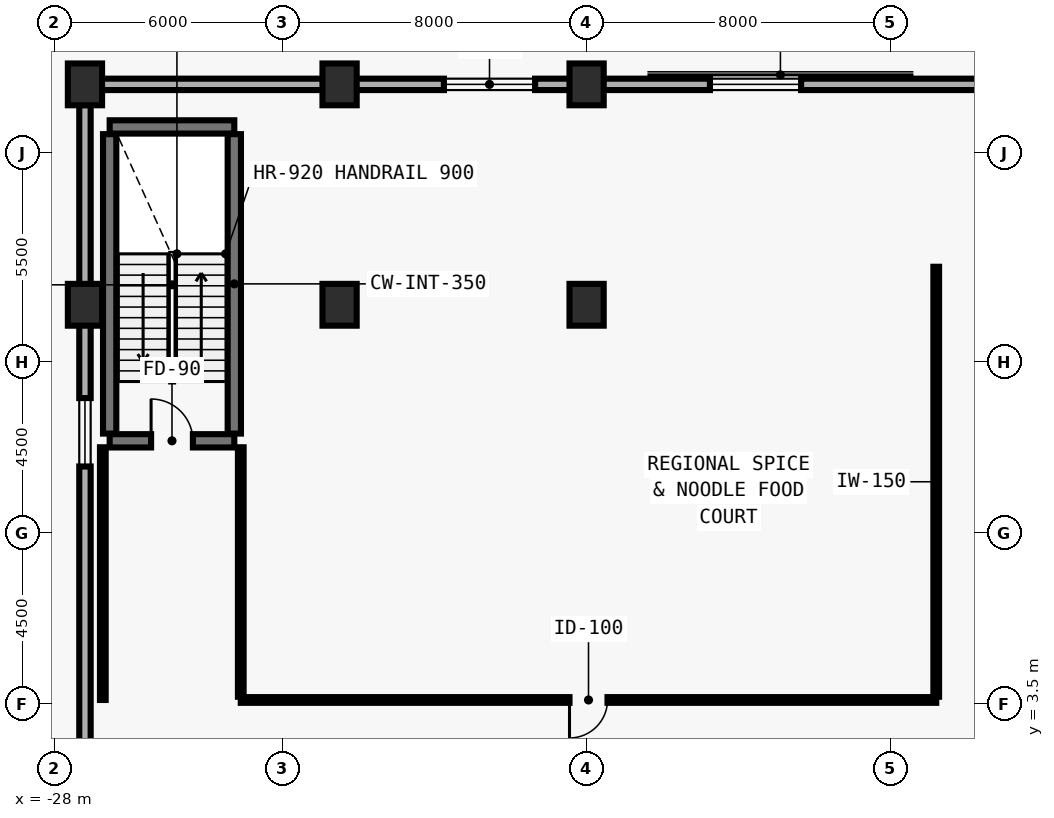
"""IFC4 building model, lengths in metres.
Left out: names, types, materials, properties, quantities, classifications, styles, units other than length and angle.
Written with IfcOpenShell. Run it as: python <this file> out.ifc"""

import sys

from ifc_helpers import new_model, si_unit, direction, frame, frame_2d, origin, origin_2d, place, context, subcontext, project, spatial, rectangle, extrude, element, fill, save


model = new_model("IFC4")
c1 = context("Model", 3, precision=1e-05, world=origin(), true_north=direction((0.0, 1.0)))
c2 = subcontext(c1, "Body", "Model", "MODEL_VIEW")
j1 = project(units=[si_unit("LENGTHUNIT", "METRE"), si_unit("PLANEANGLEUNIT", "RADIAN")], contexts=[c1])
p1 = place(None, origin())
s1 = spatial("IfcSite", under=j1, at=p1, CompositionType="ELEMENT")
p2 = place(p1, origin())
s2 = spatial("IfcBuilding", under=s1, at=p2, CompositionType="ELEMENT")
p3 = place(p2, frame((0.0, 0.0, 13.8)))
s3 = spatial("IfcBuildingStorey", under=s2, at=p3, CompositionType="ELEMENT", Elevation=13.8)
p4 = place(p3, frame((-26.55, 10.42, 0.0), z_axis=(0.0, 0.0, 1.0), x_axis=(1.0, 0.0, 0.0)))
e1 = element("IfcWall", 1, at=p4, inside=s3, PredefinedType="SHEAR", context=c2, shape_type="SweptSolid", body=[
    extrude(rectangle(XDim=3.28, YDim=0.35, at=frame_2d((1.64, 0.0))), origin(), (0.0, 0.0, 1.0), 4.592),
])
p5 = place(p4, frame((1.09, 0.0, 0.0)))
e2 = element("IfcOpeningElement", 2, at=p5, cuts=e1, PredefinedType="OPENING", context=c2, shape_type="SweptSolid", body=[
    extrude(rectangle(XDim=1.1, YDim=2.15, at=frame_2d((0.55, 1.075))), frame((0.0, 0.185, 0.0), z_axis=(0.0, -1.0, 0.0), x_axis=(1.0, 0.0, 0.0)), (0.0, 0.0, 1.0), 0.37),
])
p6 = place(p3, frame((-26.55, 18.68, 0.0), z_axis=(0.0, 0.0, 1.0), x_axis=(1.0, 0.0, 0.0)))
e3 = element("IfcWall", 3, at=p6, inside=s3, PredefinedType="SHEAR", context=c2, shape_type="SweptSolid", body=[
    extrude(rectangle(XDim=3.28, YDim=0.35, at=frame_2d((1.64, 0.0))), origin(), (0.0, 0.0, 1.0), 4.592),
])
for number, where, z_axis, x_axis in (
    (4, (-26.55, 10.61, 0.0), (0.0, 0.0, 1.0), (0.0, 1.0, 0.0)),
    (5, (-23.27, 10.61, 0.0), (0.0, 0.0, 1.0), (0.0, 1.0, 0.0)),
):
    element("IfcWall", number, at=place(p3, frame(where, z_axis=z_axis, x_axis=x_axis)), inside=s3, PredefinedType="SHEAR", context=c2, shape_type="SweptSolid", body=[
        extrude(rectangle(XDim=7.88, YDim=0.35, at=frame_2d((3.94, 0.0))), origin(), (0.0, 0.0, 1.0), 4.592),
    ])
for number, where, z_axis, x_axis in (
    (6, (-27.2, 14.0, 0.0), (0.0, 0.0, 1.0), (1.0, 0.0, 0.0)),
    (7, (-27.2, 19.8, 0.0), (0.0, 0.0, 1.0), (1.0, 0.0, 0.0)),
    (8, (-20.5, 14.0, 0.0), (0.0, 0.0, 1.0), (1.0, 0.0, 0.0)),
    (9, (-20.5, 19.8, 0.0), (0.0, 0.0, 1.0), (1.0, 0.0, 0.0)),
    (10, (-14.0, 14.0, 0.0), (0.0, 0.0, 1.0), (1.0, 0.0, 0.0)),
    (11, (-14.0, 19.8, 0.0), (0.0, 0.0, 1.0), (1.0, 0.0, 0.0)),
):
    element("IfcColumn", number, at=place(p3, frame(where, z_axis=z_axis, x_axis=x_axis)), inside=s3, PredefinedType="COLUMN", context=c2, shape_type="SweptSolid", body=[
        extrude(rectangle(XDim=0.9, YDim=1.1, at=origin_2d()), origin(), (0.0, 0.0, 1.0), 4.575),
    ])
p7 = place(p3, frame((-27.2, -19.255, 0.0), z_axis=(0.0, 0.0, 1.0), x_axis=(0.0, 1.0, 0.0)))
e12 = element("IfcWall", 12, at=p7, inside=s3, PredefinedType="SOLIDWALL", context=c2, shape_type="SweptSolid", body=[
    extrude(rectangle(XDim=38.51, YDim=0.3, at=frame_2d((19.255, 0.0))), origin(), (0.0, 0.0, 1.0), 3.35),
])
p8 = place(p7, frame((9.0, 0.0, 0.85)))
e13 = element("IfcOpeningElement", 13, at=p8, cuts=e12, PredefinedType="OPENING", context=c2, shape_type="SweptSolid", body=[
    extrude(rectangle(XDim=1.8, YDim=1.9, at=frame_2d((0.9, 0.95))), frame((0.0, 0.16, 0.0), z_axis=(0.0, -1.0, 0.0), x_axis=(1.0, 0.0, 0.0)), (0.0, 0.0, 1.0), 0.32),
])
p9 = place(p7, frame((16.0, 0.0, 0.85)))
e14 = element("IfcOpeningElement", 14, at=p9, cuts=e12, PredefinedType="OPENING", context=c2, shape_type="SweptSolid", body=[
    extrude(rectangle(XDim=1.8, YDim=1.9, at=frame_2d((0.9, 0.95))), frame((0.0, 0.16, 0.0), z_axis=(0.0, -1.0, 0.0), x_axis=(1.0, 0.0, 0.0)), (0.0, 0.0, 1.0), 0.32),
])
p10 = place(p7, frame((29.0, 0.0, 0.85)))
e15 = element("IfcOpeningElement", 15, at=p10, cuts=e12, PredefinedType="OPENING", context=c2, shape_type="SweptSolid", body=[
    extrude(rectangle(XDim=1.8, YDim=1.9, at=frame_2d((0.9, 0.95))), frame((0.0, 0.16, 0.0), z_axis=(0.0, -1.0, 0.0), x_axis=(1.0, 0.0, 0.0)), (0.0, 0.0, 1.0), 0.32),
])
p11 = place(p3, frame((-26.755, 19.8, 0.0), z_axis=(0.0, 0.0, 1.0), x_axis=(1.0, 0.0, 0.0)))
e16 = element("IfcWall", 16, at=p11, inside=s3, PredefinedType="SOLIDWALL", context=c2, shape_type="SweptSolid", body=[
    extrude(rectangle(XDim=53.51, YDim=0.3, at=frame_2d((26.755, 0.0))), origin(), (0.0, 0.0, 1.0), 3.35),
])
p12 = place(p11, frame((9.0, 0.0, 0.85)))
e17 = element("IfcOpeningElement", 17, at=p12, cuts=e16, PredefinedType="OPENING", context=c2, shape_type="SweptSolid", body=[
    extrude(rectangle(XDim=2.4, YDim=1.9, at=frame_2d((1.2, 0.95))), frame((0.0, 0.16, 0.0), z_axis=(0.0, -1.0, 0.0), x_axis=(1.0, 0.0, 0.0)), (0.0, 0.0, 1.0), 0.32),
])
p13 = place(p11, frame((16.0, 0.0, 0.85)))
e18 = element("IfcOpeningElement", 18, at=p13, cuts=e16, PredefinedType="OPENING", context=c2, shape_type="SweptSolid", body=[
    extrude(rectangle(XDim=2.4, YDim=1.9, at=frame_2d((1.2, 0.95))), frame((0.0, 0.16, 0.0), z_axis=(0.0, -1.0, 0.0), x_axis=(1.0, 0.0, 0.0)), (0.0, 0.0, 1.0), 0.32),
])
p14 = place(p11, frame((29.0, 0.0, 0.85)))
e19 = element("IfcOpeningElement", 19, at=p14, cuts=e16, PredefinedType="OPENING", context=c2, shape_type="SweptSolid", body=[
    extrude(rectangle(XDim=2.4, YDim=1.9, at=frame_2d((1.2, 0.95))), frame((0.0, 0.16, 0.0), z_axis=(0.0, -1.0, 0.0), x_axis=(1.0, 0.0, 0.0)), (0.0, 0.0, 1.0), 0.32),
])
p15 = place(p3, frame((-4.8, 3.6, 0.0), z_axis=(0.0, 0.0, 1.0), x_axis=(-1.0, 0.0, 0.0)))
e20 = element("IfcWall", 20, at=p15, inside=s3, PredefinedType="PARTITIONING", context=c2, shape_type="SweptSolid", body=[
    extrude(rectangle(XDim=18.3, YDim=0.15, at=frame_2d((9.15, 0.0))), origin(), (0.0, 0.0, 1.0), 4.28),
])
p16 = place(p15, frame((8.65, 0.0, 0.0)))
e21 = element("IfcOpeningElement", 21, at=p16, cuts=e20, PredefinedType="OPENING", context=c2, shape_type="SweptSolid", body=[
    extrude(rectangle(XDim=1.0, YDim=2.1, at=frame_2d((0.5, 1.05))), frame((0.0, 0.085, 0.0), z_axis=(0.0, -1.0, 0.0), x_axis=(1.0, 0.0, 0.0)), (0.0, 0.0, 1.0), 0.17),
])
p17 = place(p3, frame((-4.8, 15.0, 0.0), z_axis=(0.0, 0.0, 1.0), x_axis=(0.0, -1.0, 0.0)))
e22 = element("IfcWall", 22, at=p17, inside=s3, PredefinedType="PARTITIONING", context=c2, shape_type="SweptSolid", body=[
    extrude(rectangle(XDim=11.315, YDim=0.15, at=frame_2d((5.657, 0.0))), origin(), (0.0, 0.0, 1.0), 4.28),
])
p18 = place(p3, frame((-23.1, 3.685, 0.0), z_axis=(0.0, 0.0, 1.0), x_axis=(0.0, 1.0, 0.0)))
e23 = element("IfcWall", 23, at=p18, inside=s3, PredefinedType="PARTITIONING", context=c2, shape_type="SweptSolid", body=[
    extrude(rectangle(XDim=6.565, YDim=0.15, at=frame_2d((3.282, 0.0))), origin(), (0.0, 0.0, 1.0), 4.28),
])
p19 = place(p3, frame((-26.73, 10.25, 0.0), z_axis=(0.0, 0.0, 1.0), x_axis=(0.0, -1.0, 0.0)))
e24 = element("IfcWall", 24, at=p19, inside=s3, PredefinedType="PARTITIONING", context=c2, shape_type="SweptSolid", body=[
    extrude(rectangle(XDim=6.65, YDim=0.15, at=frame_2d((3.325, 0.0))), origin(), (0.0, 0.0, 1.0), 4.28),
])
p20 = place(p10, origin())
e25 = element("IfcWindow", 25, at=p20, inside=s3, PartitioningType="SINGLE_PANEL", PredefinedType="WINDOW", context=c2, shape_type="SweptSolid", body=[
    extrude(rectangle(XDim=1.8, YDim=1.9, at=frame_2d((0.9, 0.95))), frame((0.0, 0.03, 0.0), z_axis=(0.0, -1.0, 0.0), x_axis=(1.0, 0.0, 0.0)), (0.0, 0.0, 1.0), 0.06),
])
fill(e15, e25)
p21 = place(p12, origin())
e26 = element("IfcWindow", 26, at=p21, inside=s3, PartitioningType="SINGLE_PANEL", PredefinedType="WINDOW", context=c2, shape_type="SweptSolid", body=[
    extrude(rectangle(XDim=2.4, YDim=1.9, at=frame_2d((1.2, 0.95))), frame((0.0, 0.03, 0.0), z_axis=(0.0, -1.0, 0.0), x_axis=(1.0, 0.0, 0.0)), (0.0, 0.0, 1.0), 0.06),
])
fill(e17, e26)
p22 = place(p13, origin())
e27 = element("IfcWindow", 27, at=p22, inside=s3, PartitioningType="SINGLE_PANEL", PredefinedType="WINDOW", context=c2, shape_type="SweptSolid", body=[
    extrude(rectangle(XDim=2.4, YDim=1.9, at=frame_2d((1.2, 0.95))), frame((0.0, 0.03, 0.0), z_axis=(0.0, -1.0, 0.0), x_axis=(1.0, 0.0, 0.0)), (0.0, 0.0, 1.0), 0.06),
])
fill(e18, e27)
p23 = place(p5, origin())
e28 = element("IfcDoor", 28, at=p23, inside=s3, OperationType="SINGLE_SWING_LEFT", PredefinedType="DOOR", context=c2, shape_type="SweptSolid", body=[
    extrude(rectangle(XDim=1.1, YDim=2.15, at=frame_2d((0.55, 1.075))), frame((0.0, 0.025, 0.0), z_axis=(0.0, -1.0, 0.0), x_axis=(1.0, 0.0, 0.0)), (0.0, 0.0, 1.0), 0.05),
])
fill(e2, e28)
p24 = place(p16, origin())
e29 = element("IfcDoor", 29, at=p24, inside=s3, OperationType="SINGLE_SWING_RIGHT", PredefinedType="DOOR", context=c2, shape_type="SweptSolid", body=[
    extrude(rectangle(XDim=1.0, YDim=2.1, at=frame_2d((0.5, 1.05))), frame((0.0, 0.025, 0.0), z_axis=(0.0, -1.0, 0.0), x_axis=(1.0, 0.0, 0.0)), (0.0, 0.0, 1.0), 0.05),
])
fill(e21, e29)
save(model, sys.argv[1])
